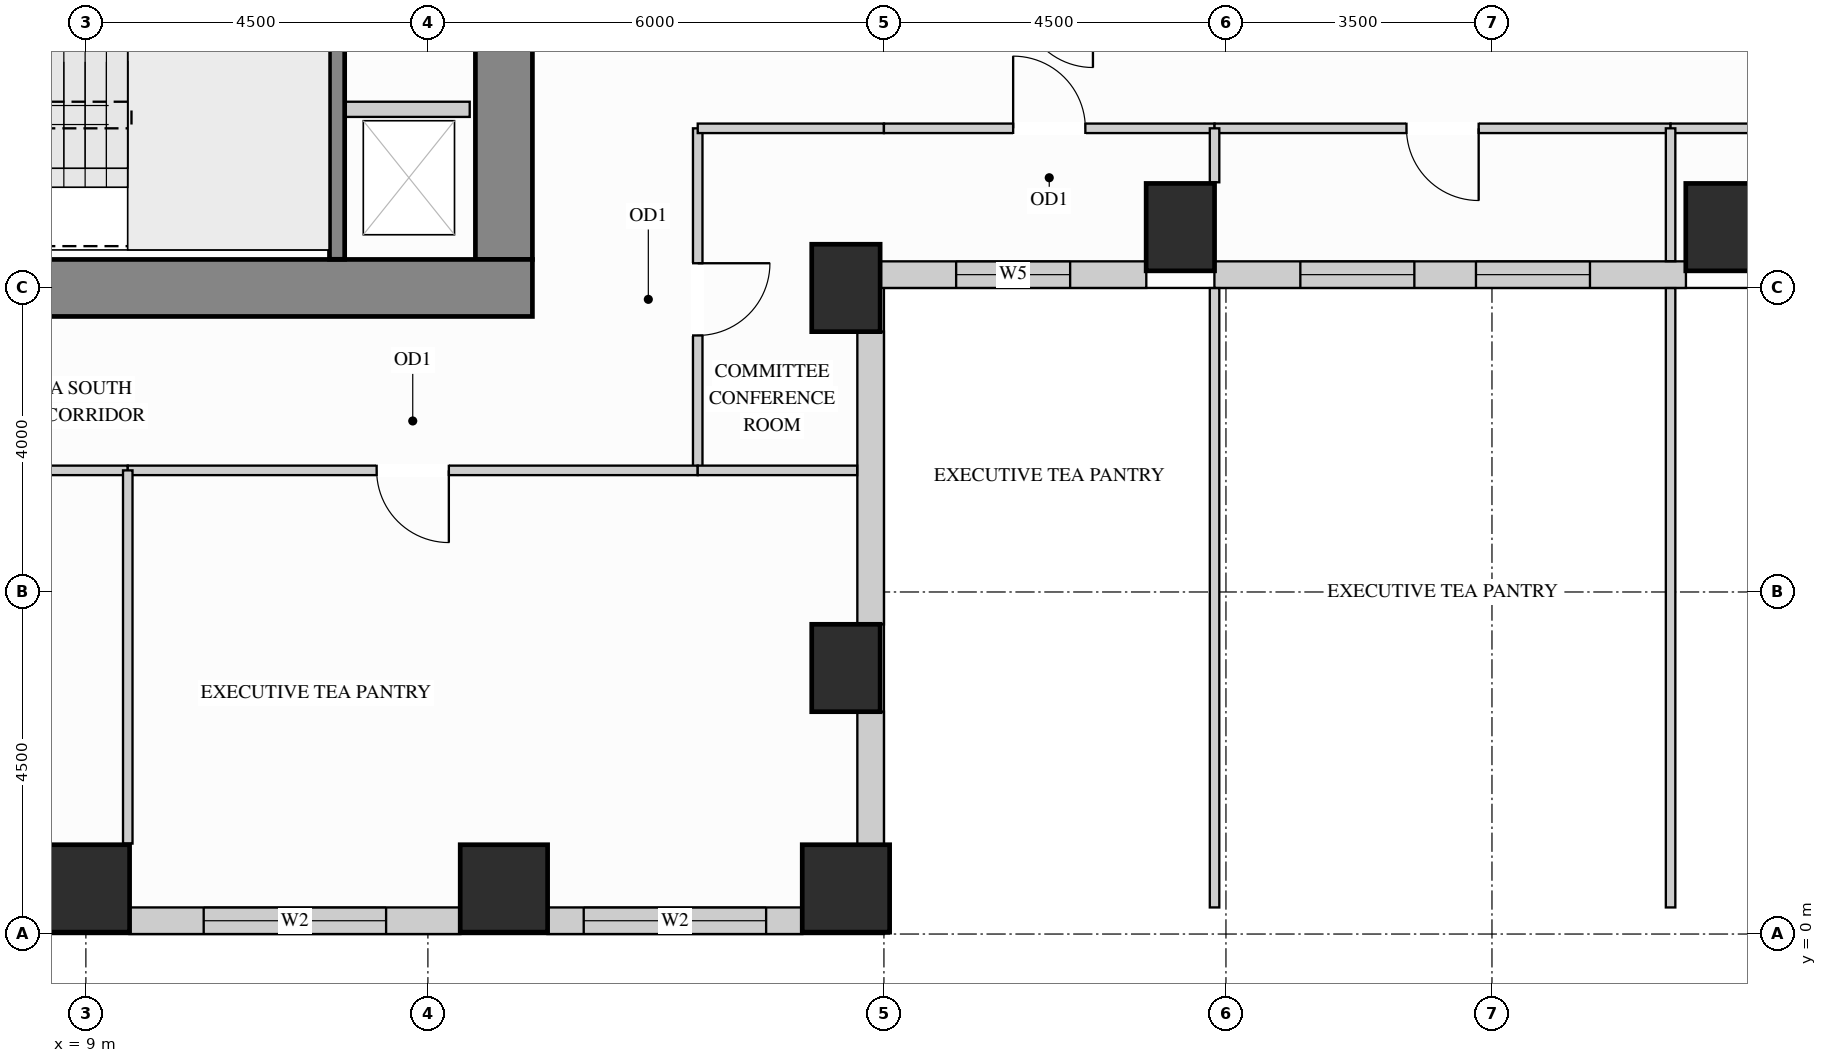
"""IFC4 building model, lengths in metres.
Left out: names, types, materials, properties, quantities, classifications, styles, units other than length and angle.
Written with IfcOpenShell. Run it as: python <this file> out.ifc"""

import sys

from ifc_helpers import new_model, si_unit, direction, frame, frame_2d, origin, origin_2d, place, context, subcontext, project, spatial, rectangle, extrude, source, transform, mapped, element, fill, save


model = new_model("IFC4")
c1 = context("Model", 3, precision=1e-05, world=origin(), true_north=direction((0.0, 1.0)))
c2 = subcontext(c1, "Body", "Model", "MODEL_VIEW")
j1 = project(units=[si_unit("LENGTHUNIT", "METRE"), si_unit("PLANEANGLEUNIT", "RADIAN")], contexts=[c1])
p1 = place(None, origin())
s1 = spatial("IfcSite", under=j1, at=p1, CompositionType="ELEMENT")
p2 = place(p1, origin())
s2 = spatial("IfcBuilding", under=s1, at=p2, CompositionType="ELEMENT")
p3 = place(p2, frame((0.0, 0.0, 113.4)))
s3 = spatial("IfcBuildingStorey", under=s2, at=p3, CompositionType="ELEMENT", Elevation=113.4)
m1 = source(origin(), c2, "Body", "SweptSolid", [
    extrude(rectangle(XDim=0.9, YDim=1.15, at=origin_2d()), origin(), (0.0, 0.0, 1.0), 3.38),
])
for number, where, z_axis, x_axis in (
    (1, (19.0, 3.5, 0.0), (0.0, 0.0, 1.0), (1.0, 0.0, 0.0)),
    (2, (19.0, 8.5, 0.0), (0.0, 0.0, 1.0), (1.0, 0.0, 0.0)),
    (3, (23.4, 9.3, 0.0), (0.0, 0.0, 1.0), (1.0, 0.0, 0.0)),
    (4, (30.5, 9.3, 0.0), (0.0, 0.0, 1.0), (1.0, 0.0, 0.0)),
):
    element("IfcColumn", number, at=place(p3, frame(where, z_axis=z_axis, x_axis=x_axis)), inside=s3, PredefinedType="COLUMN", context=c2, shape_type="MappedRepresentation", body=[
        mapped(m1, transform((0.0, 0.0, 0.0), x_axis=(1.0, 0.0, 0.0), y_axis=(0.0, 1.0, 0.0), z_axis=(0.0, 0.0, 1.0))),
    ])
m2 = source(origin(), c2, "Body", "SweptSolid", [
    extrude(rectangle(XDim=1.15, YDim=1.15, at=origin_2d()), origin(), (0.0, 0.0, 1.0), 3.38),
])
for number, where, z_axis, x_axis in (
    (5, (14.5, 0.6, 0.0), (0.0, 0.0, 1.0), (1.0, 0.0, 0.0)),
    (6, (19.0, 0.6, 0.0), (0.0, 0.0, 1.0), (1.0, 0.0, 0.0)),
    (7, (9.0, 0.6, 0.0), (0.0, 0.0, 1.0), (1.0, 0.0, 0.0)),
):
    element("IfcColumn", number, at=place(p3, frame(where, z_axis=z_axis, x_axis=x_axis)), inside=s3, PredefinedType="COLUMN", context=c2, shape_type="MappedRepresentation", body=[
        mapped(m2, transform((0.0, 0.0, 0.0), x_axis=(1.0, 0.0, 0.0), y_axis=(0.0, 1.0, 0.0), z_axis=(0.0, 0.0, 1.0))),
    ])
m3 = source(origin(), c2, "Body", "SweptSolid", [
    extrude(rectangle(XDim=9.945, YDim=0.75, at=frame_2d((4.973, 0.0))), origin(), (0.0, 0.0, 1.0), 3.38),
])
p4 = place(p3, frame((14.5, 8.875, 0.0), z_axis=(0.0, 0.0, 1.0), x_axis=(0.0, 1.0, 0.0)))
e8 = element("IfcWall", 8, at=p4, inside=s3, PredefinedType="SHEAR", context=c2, shape_type="MappedRepresentation", body=[
    mapped(m3, transform((0.0, 0.0, 0.0), x_axis=(1.0, 0.0, 0.0), y_axis=(0.0, 1.0, 0.0), z_axis=(0.0, 0.0, 1.0))),
])
m4 = source(origin(), c2, "Body", "SweptSolid", [
    extrude(rectangle(XDim=10.75, YDim=0.75, at=frame_2d((5.375, 0.0))), origin(), (0.0, 0.0, 1.0), 3.38),
])
p5 = place(p3, frame((4.125, 8.5, 0.0), z_axis=(0.0, 0.0, 1.0), x_axis=(1.0, 0.0, 0.0)))
e9 = element("IfcWall", 9, at=p5, inside=s3, PredefinedType="SHEAR", context=c2, shape_type="MappedRepresentation", body=[
    mapped(m4, transform((0.0, 0.0, 0.0), x_axis=(1.0, 0.0, 0.0), y_axis=(0.0, 1.0, 0.0), z_axis=(0.0, 0.0, 1.0))),
])
p6 = place(p3, frame((9.573, 0.175, 0.0), z_axis=(0.0, 0.0, 1.0), x_axis=(1.0, 0.0, 0.0)))
e10 = element("IfcWall", 10, at=p6, inside=s3, PredefinedType="SOLIDWALL", context=c2, shape_type="SweptSolid", body=[
    extrude(rectangle(XDim=4.354, YDim=0.35, at=frame_2d((2.177, 0.0))), origin(), (0.0, 0.0, 1.0), 3.365),
])
p7 = place(p6, frame((0.977, 0.0, 0.78)))
e11 = element("IfcOpeningElement", 11, at=p7, cuts=e10, PredefinedType="OPENING", context=c2, shape_type="SweptSolid", body=[
    extrude(rectangle(XDim=2.4, YDim=2.1, at=frame_2d((1.2, 1.05))), frame((0.0, 0.185, 0.0), z_axis=(0.0, -1.0, 0.0), x_axis=(1.0, 0.0, 0.0)), (0.0, 0.0, 1.0), 0.37),
])
p8 = place(p3, frame((15.073, 0.175, 0.0), z_axis=(0.0, 0.0, 1.0), x_axis=(1.0, 0.0, 0.0)))
e12 = element("IfcWall", 12, at=p8, inside=s3, PredefinedType="SOLIDWALL", context=c2, shape_type="SweptSolid", body=[
    extrude(rectangle(XDim=3.354, YDim=0.35, at=frame_2d((1.677, 0.0))), origin(), (0.0, 0.0, 1.0), 3.365),
])
p9 = place(p8, frame((0.477, 0.0, 0.78)))
e13 = element("IfcOpeningElement", 13, at=p9, cuts=e12, PredefinedType="OPENING", context=c2, shape_type="SweptSolid", body=[
    extrude(rectangle(XDim=2.4, YDim=2.1, at=frame_2d((1.2, 1.05))), frame((0.0, 0.185, 0.0), z_axis=(0.0, -1.0, 0.0), x_axis=(1.0, 0.0, 0.0)), (0.0, 0.0, 1.0), 0.37),
])
m5 = source(origin(), c2, "Body", "SweptSolid", [
    extrude(rectangle(XDim=1.754, YDim=0.35, at=frame_2d((0.877, 0.0))), origin(), (0.0, 0.0, 1.0), 2.519),
])
p10 = place(p3, frame((19.325, 1.173, 0.0), z_axis=(0.0, 0.0, 1.0), x_axis=(0.0, 1.0, 0.0)))
e14 = element("IfcWall", 14, at=p10, inside=s3, PredefinedType="SOLIDWALL", context=c2, shape_type="MappedRepresentation", body=[
    mapped(m5, transform((0.0, 0.0, 0.0), x_axis=(1.0, 0.0, 0.0), y_axis=(0.0, 1.0, 0.0), z_axis=(0.0, 0.0, 1.0))),
])
m6 = source(origin(), c2, "Body", "SweptSolid", [
    extrude(rectangle(XDim=3.854, YDim=0.35, at=frame_2d((1.927, 0.0))), origin(), (0.0, 0.0, 1.0), 2.519),
])
p11 = place(p3, frame((19.325, 4.073, 0.0), z_axis=(0.0, 0.0, 1.0), x_axis=(0.0, 1.0, 0.0)))
e15 = element("IfcWall", 15, at=p11, inside=s3, PredefinedType="SOLIDWALL", context=c2, shape_type="MappedRepresentation", body=[
    mapped(m6, transform((0.0, 0.0, 0.0), x_axis=(1.0, 0.0, 0.0), y_axis=(0.0, 1.0, 0.0), z_axis=(0.0, 0.0, 1.0))),
])
p12 = place(p3, frame((19.448, 8.675, 0.0), z_axis=(0.0, 0.0, 1.0), x_axis=(1.0, 0.0, 0.0)))
e16 = element("IfcWall", 16, at=p12, inside=s3, PredefinedType="SOLIDWALL", context=c2, shape_type="SweptSolid", body=[
    extrude(rectangle(XDim=3.504, YDim=0.35, at=frame_2d((1.752, 0.0))), origin(), (0.0, 0.0, 1.0), 3.365),
])
p13 = place(p12, frame((1.002, 0.0, 0.78)))
e17 = element("IfcOpeningElement", 17, at=p13, cuts=e16, PredefinedType="OPENING", context=c2, shape_type="SweptSolid", body=[
    extrude(rectangle(XDim=1.5, YDim=2.0, at=frame_2d((0.75, 1.0))), frame((0.0, 0.185, 0.0), z_axis=(0.0, -1.0, 0.0), x_axis=(1.0, 0.0, 0.0)), (0.0, 0.0, 1.0), 0.37),
])
p14 = place(p3, frame((23.848, 8.675, 0.0), z_axis=(0.0, 0.0, 1.0), x_axis=(1.0, 0.0, 0.0)))
e18 = element("IfcWall", 18, at=p14, inside=s3, PredefinedType="SOLIDWALL", context=c2, shape_type="SweptSolid", body=[
    extrude(rectangle(XDim=6.204, YDim=0.35, at=frame_2d((3.102, 0.0))), origin(), (0.0, 0.0, 1.0), 3.365),
])
p15 = place(p14, frame((1.131, 0.0, 0.78)))
e19 = element("IfcOpeningElement", 19, at=p15, cuts=e18, PredefinedType="OPENING", context=c2, shape_type="SweptSolid", body=[
    extrude(rectangle(XDim=1.5, YDim=2.0, at=frame_2d((0.75, 1.0))), frame((0.0, 0.185, 0.0), z_axis=(0.0, -1.0, 0.0), x_axis=(1.0, 0.0, 0.0)), (0.0, 0.0, 1.0), 0.37),
])
p16 = place(p14, frame((3.441, 0.0, 0.78)))
e20 = element("IfcOpeningElement", 20, at=p16, cuts=e18, PredefinedType="OPENING", context=c2, shape_type="SweptSolid", body=[
    extrude(rectangle(XDim=1.5, YDim=2.0, at=frame_2d((0.75, 1.0))), frame((0.0, 0.185, 0.0), z_axis=(0.0, -1.0, 0.0), x_axis=(1.0, 0.0, 0.0)), (0.0, 0.0, 1.0), 0.37),
])
p17 = place(p3, frame((17.05, 6.1, 0.0), z_axis=(0.0, 0.0, 1.0), x_axis=(0.0, 1.0, 0.0)))
e21 = element("IfcWall", 21, at=p17, inside=s3, PredefinedType="PARTITIONING", context=c2, shape_type="SweptSolid", body=[
    extrude(rectangle(XDim=4.5, YDim=0.125, at=frame_2d((2.25, 0.0))), origin(), (0.0, 0.0, 1.0), 3.365),
])
p18 = place(p17, frame((1.775, 0.0, 0.0)))
e22 = element("IfcOpeningElement", 22, at=p18, cuts=e21, PredefinedType="OPENING", context=c2, shape_type="SweptSolid", body=[
    extrude(rectangle(XDim=0.95, YDim=2.15, at=frame_2d((0.475, 1.075))), frame((0.0, 0.073, 0.0), z_axis=(0.0, -1.0, 0.0), x_axis=(1.0, 0.0, 0.0)), (0.0, 0.0, 1.0), 0.145),
])
m7 = source(origin(), c2, "Body", "SweptSolid", [
    extrude(rectangle(XDim=2.45, YDim=0.125, at=frame_2d((1.225, 0.0))), origin(), (0.0, 0.0, 1.0), 3.365),
])
p19 = place(p3, frame((17.05, 10.6, 0.0), z_axis=(0.0, 0.0, 1.0), x_axis=(1.0, 0.0, 0.0)))
e23 = element("IfcWall", 23, at=p19, inside=s3, PredefinedType="PARTITIONING", context=c2, shape_type="MappedRepresentation", body=[
    mapped(m7, transform((0.0, 0.0, 0.0), x_axis=(1.0, 0.0, 0.0), y_axis=(0.0, 1.0, 0.0), z_axis=(0.0, 0.0, 1.0))),
])
p20 = place(p3, frame((19.5, 10.6, 0.0), z_axis=(0.0, 0.0, 1.0), x_axis=(1.0, 0.0, 0.0)))
e24 = element("IfcWall", 24, at=p20, inside=s3, PredefinedType="PARTITIONING", context=c2, shape_type="SweptSolid", body=[
    extrude(rectangle(XDim=4.35, YDim=0.125, at=frame_2d((2.175, 0.0))), origin(), (0.0, 0.0, 1.0), 3.365),
])
p21 = place(p20, frame((1.7, 0.0, 0.0)))
e25 = element("IfcOpeningElement", 25, at=p21, cuts=e24, PredefinedType="OPENING", context=c2, shape_type="SweptSolid", body=[
    extrude(rectangle(XDim=0.95, YDim=2.15, at=frame_2d((0.475, 1.075))), frame((0.0, 0.073, 0.0), z_axis=(0.0, -1.0, 0.0), x_axis=(1.0, 0.0, 0.0)), (0.0, 0.0, 1.0), 0.145),
])
p22 = place(p3, frame((23.85, 10.6, 0.0), z_axis=(0.0, 0.0, 1.0), x_axis=(1.0, 0.0, 0.0)))
e26 = element("IfcWall", 26, at=p22, inside=s3, PredefinedType="PARTITIONING", context=c2, shape_type="SweptSolid", body=[
    extrude(rectangle(XDim=6.0, YDim=0.125, at=frame_2d((3.0, 0.0))), origin(), (0.0, 0.0, 1.0), 3.365),
])
p23 = place(p22, frame((2.525, 0.0, 0.0)))
e27 = element("IfcOpeningElement", 27, at=p23, cuts=e26, PredefinedType="OPENING", context=c2, shape_type="SweptSolid", body=[
    extrude(rectangle(XDim=0.95, YDim=2.15, at=frame_2d((0.475, 1.075))), frame((0.0, 0.073, 0.0), z_axis=(0.0, -1.0, 0.0), x_axis=(1.0, 0.0, 0.0)), (0.0, 0.0, 1.0), 0.145),
])
p24 = place(p3, frame((29.85, 10.6, 0.0), z_axis=(0.0, 0.0, 1.0), x_axis=(1.0, 0.0, 0.0)))
e28 = element("IfcWall", 28, at=p24, inside=s3, PredefinedType="PARTITIONING", context=c2, shape_type="SweptSolid", body=[
    extrude(rectangle(XDim=4.55, YDim=0.125, at=frame_2d((2.275, 0.0))), origin(), (0.0, 0.0, 1.0), 3.365),
])
p25 = place(p24, frame((1.8, 0.0, 0.0)))
e29 = element("IfcOpeningElement", 29, at=p25, cuts=e28, PredefinedType="OPENING", context=c2, shape_type="SweptSolid", body=[
    extrude(rectangle(XDim=0.95, YDim=2.15, at=frame_2d((0.475, 1.075))), frame((0.0, 0.073, 0.0), z_axis=(0.0, -1.0, 0.0), x_axis=(1.0, 0.0, 0.0)), (0.0, 0.0, 1.0), 0.145),
])
m8 = source(origin(), c2, "Body", "SweptSolid", [
    extrude(rectangle(XDim=8.148, YDim=0.125, at=frame_2d((4.074, 0.0))), origin(), (0.0, 0.0, 1.0), 3.365),
])
p26 = place(p3, frame((23.85, 0.35, 0.0), z_axis=(0.0, 0.0, 1.0), x_axis=(0.0, 1.0, 0.0)))
e30 = element("IfcWall", 30, at=p26, inside=s3, PredefinedType="PARTITIONING", context=c2, shape_type="MappedRepresentation", body=[
    mapped(m8, transform((0.0, 0.0, 0.0), x_axis=(1.0, 0.0, 0.0), y_axis=(0.0, 1.0, 0.0), z_axis=(0.0, 0.0, 1.0))),
])
m9 = source(origin(), c2, "Body", "SweptSolid", [
    extrude(rectangle(XDim=0.71, YDim=0.125, at=frame_2d((0.355, 0.0))), origin(), (0.0, 0.0, 1.0), 3.365),
])
p27 = place(p3, frame((23.85, 9.89, 0.0), z_axis=(0.0, 0.0, 1.0), x_axis=(0.0, 1.0, 0.0)))
e31 = element("IfcWall", 31, at=p27, inside=s3, PredefinedType="PARTITIONING", context=c2, shape_type="MappedRepresentation", body=[
    mapped(m9, transform((0.0, 0.0, 0.0), x_axis=(1.0, 0.0, 0.0), y_axis=(0.0, 1.0, 0.0), z_axis=(0.0, 0.0, 1.0))),
])
p28 = place(p3, frame((29.85, 0.35, 0.0), z_axis=(0.0, 0.0, 1.0), x_axis=(0.0, 1.0, 0.0)))
e32 = element("IfcWall", 32, at=p28, inside=s3, PredefinedType="PARTITIONING", context=c2, shape_type="MappedRepresentation", body=[
    mapped(m8, transform((0.0, 0.0, 0.0), x_axis=(1.0, 0.0, 0.0), y_axis=(0.0, 1.0, 0.0), z_axis=(0.0, 0.0, 1.0))),
])
m10 = source(origin(), c2, "Body", "SweptSolid", [
    extrude(rectangle(XDim=1.748, YDim=0.125, at=frame_2d((0.874, 0.0))), origin(), (0.0, 0.0, 1.0), 3.365),
])
p29 = place(p3, frame((29.85, 8.852, 0.0), z_axis=(0.0, 0.0, 1.0), x_axis=(0.0, 1.0, 0.0)))
e33 = element("IfcWall", 33, at=p29, inside=s3, PredefinedType="PARTITIONING", context=c2, shape_type="MappedRepresentation", body=[
    mapped(m10, transform((0.0, 0.0, 0.0), x_axis=(1.0, 0.0, 0.0), y_axis=(0.0, 1.0, 0.0), z_axis=(0.0, 0.0, 1.0))),
])
p30 = place(p3, frame((2.45, 6.1, 0.0), z_axis=(0.0, 0.0, 1.0), x_axis=(1.0, 0.0, 0.0)))
e34 = element("IfcWall", 34, at=p30, inside=s3, PredefinedType="PARTITIONING", context=c2, shape_type="SweptSolid", body=[
    extrude(rectangle(XDim=7.101, YDim=0.125, at=frame_2d((3.551, 0.0))), origin(), (0.0, 0.0, 1.0), 3.365),
])
p31 = place(p30, frame((3.075, 0.0, 0.0)))
e35 = element("IfcOpeningElement", 35, at=p31, cuts=e34, PredefinedType="OPENING", context=c2, shape_type="SweptSolid", body=[
    extrude(rectangle(XDim=0.95, YDim=2.15, at=frame_2d((0.475, 1.075))), frame((0.0, 0.073, 0.0), z_axis=(0.0, -1.0, 0.0), x_axis=(1.0, 0.0, 0.0)), (0.0, 0.0, 1.0), 0.145),
])
p32 = place(p3, frame((9.551, 6.1, 0.0), z_axis=(0.0, 0.0, 1.0), x_axis=(1.0, 0.0, 0.0)))
e36 = element("IfcWall", 36, at=p32, inside=s3, PredefinedType="PARTITIONING", context=c2, shape_type="SweptSolid", body=[
    extrude(rectangle(XDim=7.499, YDim=0.125, at=frame_2d((3.75, 0.0))), origin(), (0.0, 0.0, 1.0), 3.365),
])
p33 = place(p32, frame((3.274, 0.0, 0.0)))
e37 = element("IfcOpeningElement", 37, at=p33, cuts=e36, PredefinedType="OPENING", context=c2, shape_type="SweptSolid", body=[
    extrude(rectangle(XDim=0.95, YDim=2.15, at=frame_2d((0.475, 1.075))), frame((0.0, 0.073, 0.0), z_axis=(0.0, -1.0, 0.0), x_axis=(1.0, 0.0, 0.0)), (0.0, 0.0, 1.0), 0.145),
])
m11 = source(origin(), c2, "Body", "SweptSolid", [
    extrude(rectangle(XDim=2.098, YDim=0.125, at=frame_2d((1.049, 0.0))), origin(), (0.0, 0.0, 1.0), 3.365),
])
p34 = place(p3, frame((17.05, 6.1, 0.0), z_axis=(0.0, 0.0, 1.0), x_axis=(1.0, 0.0, 0.0)))
e38 = element("IfcWall", 38, at=p34, inside=s3, PredefinedType="PARTITIONING", context=c2, shape_type="MappedRepresentation", body=[
    mapped(m11, transform((0.0, 0.0, 0.0), x_axis=(1.0, 0.0, 0.0), y_axis=(0.0, 1.0, 0.0), z_axis=(0.0, 0.0, 1.0))),
])
m12 = source(origin(), c2, "Body", "SweptSolid", [
    extrude(rectangle(XDim=4.91, YDim=0.125, at=frame_2d((2.455, 0.0))), origin(), (0.0, 0.0, 1.0), 3.365),
])
p35 = place(p3, frame((9.551, 1.19, 0.0), z_axis=(0.0, 0.0, 1.0), x_axis=(0.0, 1.0, 0.0)))
e39 = element("IfcWall", 39, at=p35, inside=s3, PredefinedType="PARTITIONING", context=c2, shape_type="MappedRepresentation", body=[
    mapped(m12, transform((0.0, 0.0, 0.0), x_axis=(1.0, 0.0, 0.0), y_axis=(0.0, 1.0, 0.0), z_axis=(0.0, 0.0, 1.0))),
])
m13 = source(origin(), c2, "Body", "SweptSolid", [
    extrude(rectangle(XDim=1.63, YDim=0.2, at=frame_2d((0.815, 0.0))), origin(), (0.0, 0.0, 1.0), 3.365),
])
p36 = place(p3, frame((12.42, 10.85, 0.0), z_axis=(0.0, 0.0, 1.0), x_axis=(1.0, 0.0, 0.0)))
e40 = element("IfcWall", 40, at=p36, inside=s3, PredefinedType="PARTITIONING", context=c2, shape_type="MappedRepresentation", body=[
    mapped(m13, transform((0.0, 0.0, 0.0), x_axis=(1.0, 0.0, 0.0), y_axis=(0.0, 1.0, 0.0), z_axis=(0.0, 0.0, 1.0))),
])
m14 = source(origin(), c2, "Body", "SweptSolid", [
    extrude(rectangle(XDim=3.678, YDim=0.2, at=frame_2d((1.839, 0.0))), origin(), (0.0, 0.0, 1.0), 3.38),
])
p37 = place(p3, frame((12.305, 8.877, 0.0), z_axis=(0.0, 0.0, 1.0), x_axis=(0.0, 1.0, 0.0)))
e41 = element("IfcWall", 41, at=p37, inside=s3, PredefinedType="SHEAR", context=c2, shape_type="MappedRepresentation", body=[
    mapped(m14, transform((0.0, 0.0, 0.0), x_axis=(1.0, 0.0, 0.0), y_axis=(0.0, 1.0, 0.0), z_axis=(0.0, 0.0, 1.0))),
])
m15 = source(origin(), c2, "Body", "SweptSolid", [
    extrude(rectangle(XDim=0.95, YDim=2.15, at=frame_2d((0.475, 1.075))), frame((0.0, 0.025, 0.0), z_axis=(0.0, -1.0, 0.0), x_axis=(1.0, 0.0, 0.0)), (0.0, 0.0, 1.0), 0.05),
])
p38 = place(p18, origin())
e42 = element("IfcDoor", 42, at=p38, inside=s3, OperationType="SINGLE_SWING_RIGHT", PredefinedType="DOOR", context=c2, shape_type="MappedRepresentation", body=[
    mapped(m15, transform((0.0, 0.0, 0.0), x_axis=(1.0, 0.0, 0.0), y_axis=(0.0, 1.0, 0.0), z_axis=(0.0, 0.0, 1.0))),
])
fill(e22, e42)
p39 = place(p33, origin())
e43 = element("IfcDoor", 43, at=p39, inside=s3, OperationType="SINGLE_SWING_RIGHT", PredefinedType="DOOR", context=c2, shape_type="MappedRepresentation", body=[
    mapped(m15, transform((0.0, 0.0, 0.0), x_axis=(1.0, 0.0, 0.0), y_axis=(0.0, 1.0, 0.0), z_axis=(0.0, 0.0, 1.0))),
])
fill(e37, e43)
p40 = place(p21, origin())
e44 = element("IfcDoor", 44, at=p40, inside=s3, OperationType="SINGLE_SWING_LEFT", PredefinedType="DOOR", context=c2, shape_type="MappedRepresentation", body=[
    mapped(m15, transform((0.0, 0.0, 0.0), x_axis=(1.0, 0.0, 0.0), y_axis=(0.0, 1.0, 0.0), z_axis=(0.0, 0.0, 1.0))),
])
fill(e25, e44)
p41 = place(p23, origin())
e45 = element("IfcDoor", 45, at=p41, inside=s3, OperationType="SINGLE_SWING_RIGHT", PredefinedType="DOOR", context=c2, shape_type="MappedRepresentation", body=[
    mapped(m15, transform((0.0, 0.0, 0.0), x_axis=(1.0, 0.0, 0.0), y_axis=(0.0, 1.0, 0.0), z_axis=(0.0, 0.0, 1.0))),
])
fill(e27, e45)
m16 = source(origin(), c2, "Body", "SweptSolid", [
    extrude(rectangle(XDim=2.4, YDim=2.1, at=frame_2d((1.2, 1.05))), frame((0.0, 0.03, 0.0), z_axis=(0.0, -1.0, 0.0), x_axis=(1.0, 0.0, 0.0)), (0.0, 0.0, 1.0), 0.06),
])
p42 = place(p7, origin())
e46 = element("IfcWindow", 46, at=p42, inside=s3, PartitioningType="SINGLE_PANEL", PredefinedType="WINDOW", context=c2, shape_type="MappedRepresentation", body=[
    mapped(m16, transform((0.0, 0.0, 0.0), x_axis=(1.0, 0.0, 0.0), y_axis=(0.0, 1.0, 0.0), z_axis=(0.0, 0.0, 1.0))),
])
fill(e11, e46)
p43 = place(p9, origin())
e47 = element("IfcWindow", 47, at=p43, inside=s3, PartitioningType="SINGLE_PANEL", PredefinedType="WINDOW", context=c2, shape_type="MappedRepresentation", body=[
    mapped(m16, transform((0.0, 0.0, 0.0), x_axis=(1.0, 0.0, 0.0), y_axis=(0.0, 1.0, 0.0), z_axis=(0.0, 0.0, 1.0))),
])
fill(e13, e47)
m17 = source(origin(), c2, "Body", "SweptSolid", [
    extrude(rectangle(XDim=1.5, YDim=2.0, at=frame_2d((0.75, 1.0))), frame((0.0, 0.03, 0.0), z_axis=(0.0, -1.0, 0.0), x_axis=(1.0, 0.0, 0.0)), (0.0, 0.0, 1.0), 0.06),
])
p44 = place(p13, origin())
e48 = element("IfcWindow", 48, at=p44, inside=s3, PartitioningType="SINGLE_PANEL", PredefinedType="WINDOW", context=c2, shape_type="MappedRepresentation", body=[
    mapped(m17, transform((0.0, 0.0, 0.0), x_axis=(1.0, 0.0, 0.0), y_axis=(0.0, 1.0, 0.0), z_axis=(0.0, 0.0, 1.0))),
])
fill(e17, e48)
p45 = place(p15, origin())
e49 = element("IfcWindow", 49, at=p45, inside=s3, PartitioningType="SINGLE_PANEL", PredefinedType="WINDOW", context=c2, shape_type="MappedRepresentation", body=[
    mapped(m17, transform((0.0, 0.0, 0.0), x_axis=(1.0, 0.0, 0.0), y_axis=(0.0, 1.0, 0.0), z_axis=(0.0, 0.0, 1.0))),
])
fill(e19, e49)
p46 = place(p16, origin())
e50 = element("IfcWindow", 50, at=p46, inside=s3, PartitioningType="SINGLE_PANEL", PredefinedType="WINDOW", context=c2, shape_type="MappedRepresentation", body=[
    mapped(m17, transform((0.0, 0.0, 0.0), x_axis=(1.0, 0.0, 0.0), y_axis=(0.0, 1.0, 0.0), z_axis=(0.0, 0.0, 1.0))),
])
fill(e20, e50)
save(model, sys.argv[1])
